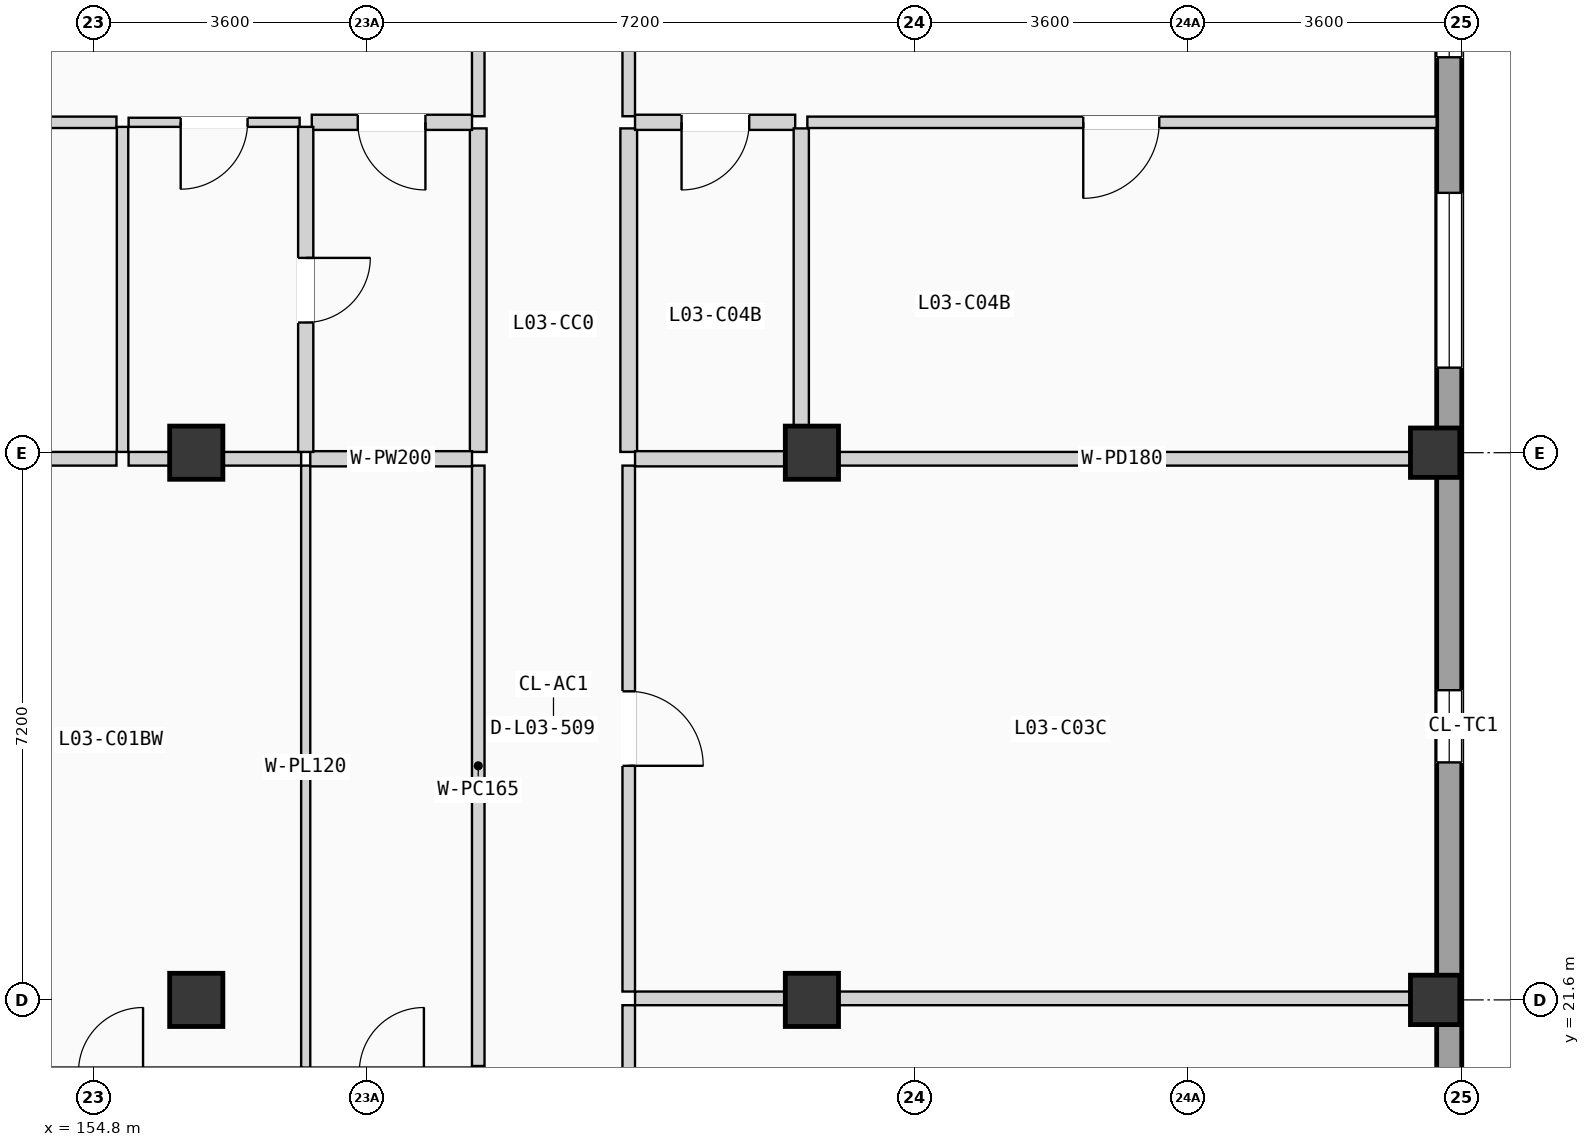
"""IFC4 building model, lengths in metres.
Left out: names, types, materials, properties, quantities, classifications, styles, units other than length and angle.
Written with IfcOpenShell. Run it as: python <this file> out.ifc"""

import sys

from ifc_helpers import new_model, si_unit, direction, frame, frame_2d, origin, origin_2d, place, context, subcontext, project, spatial, rectangle, extrude, element, fill, save


model = new_model("IFC4")
c1 = context("Model", 3, precision=1e-05, world=origin(), true_north=direction((0.0, 1.0)))
c2 = subcontext(c1, "Body", "Model", "MODEL_VIEW")
j1 = project(units=[si_unit("LENGTHUNIT", "METRE"), si_unit("PLANEANGLEUNIT", "RADIAN")], contexts=[c1])
p1 = place(None, origin())
s1 = spatial("IfcSite", under=j1, at=p1, CompositionType="ELEMENT")
p2 = place(p1, origin())
s2 = spatial("IfcBuilding", under=s1, at=p2, CompositionType="ELEMENT")
p3 = place(p2, frame((0.0, 0.0, 12.075)))
s3 = spatial("IfcBuildingStorey", under=s2, at=p3, CompositionType="ELEMENT", Elevation=12.075)
for number, where, z_axis, x_axis in (
    (1, (156.15, 21.6, 0.0), (0.0, 0.0, 1.0), (1.0, 0.0, 0.0)),
    (2, (156.15, 28.8, 0.0), (0.0, 0.0, 1.0), (1.0, 0.0, 0.0)),
    (3, (164.25, 21.6, 0.0), (0.0, 0.0, 1.0), (1.0, 0.0, 0.0)),
    (4, (164.25, 28.8, 0.0), (0.0, 0.0, 1.0), (1.0, 0.0, 0.0)),
):
    element("IfcColumn", number, at=place(p3, frame(where, z_axis=z_axis, x_axis=x_axis)), inside=s3, PredefinedType="COLUMN", context=c2, shape_type="SweptSolid", body=[
        extrude(rectangle(XDim=0.7, YDim=0.7, at=origin_2d()), origin(), (0.0, 0.0, 1.0), 3.15),
    ])
for number, where, z_axis, x_axis in (
    (5, (172.45, 21.6, 0.0), (0.0, 0.0, 1.0), (1.0, 0.0, 0.0)),
    (6, (172.45, 28.8, 0.0), (0.0, 0.0, 1.0), (1.0, 0.0, 0.0)),
):
    element("IfcColumn", number, at=place(p3, frame(where, z_axis=z_axis, x_axis=x_axis)), inside=s3, PredefinedType="COLUMN", context=c2, shape_type="SweptSolid", body=[
        extrude(rectangle(XDim=0.65, YDim=0.65, at=origin_2d()), origin(), (0.0, 0.0, 1.0), 3.15),
    ])
p4 = place(p3, frame((172.635, 0.33, 0.0), z_axis=(0.0, 0.0, 1.0), x_axis=(0.0, 1.0, 0.0)))
e7 = element("IfcWall", 7, at=p4, inside=s3, PredefinedType="SOLIDWALL", context=c2, shape_type="SweptSolid", body=[
    extrude(rectangle(XDim=49.74, YDim=0.33, at=frame_2d((24.87, 0.0))), origin(), (0.0, 0.0, 1.0), 2.89),
])
p5 = place(p4, frame((9.46, 0.0, 0.705)))
e8 = element("IfcOpeningElement", 8, at=p5, cuts=e7, PredefinedType="OPENING", context=c2, shape_type="SweptSolid", body=[
    extrude(rectangle(XDim=2.15, YDim=1.5, at=frame_2d((1.075, 0.75))), frame((0.0, 0.175, 0.0), z_axis=(0.0, -1.0, 0.0), x_axis=(1.0, 0.0, 0.0)), (0.0, 0.0, 1.0), 0.35),
])
p6 = place(p4, frame((16.61, 0.0, 0.555)))
e9 = element("IfcOpeningElement", 9, at=p6, cuts=e7, PredefinedType="OPENING", context=c2, shape_type="SweptSolid", body=[
    extrude(rectangle(XDim=2.15, YDim=1.65, at=frame_2d((1.075, 0.825))), frame((0.0, 0.175, 0.0), z_axis=(0.0, -1.0, 0.0), x_axis=(1.0, 0.0, 0.0)), (0.0, 0.0, 1.0), 0.35),
])
p7 = place(p4, frame((24.395, 0.0, 0.85)))
e10 = element("IfcOpeningElement", 10, at=p7, cuts=e7, PredefinedType="OPENING", context=c2, shape_type="SweptSolid", body=[
    extrude(rectangle(XDim=0.95, YDim=1.2, at=frame_2d((0.475, 0.6))), frame((0.0, 0.175, 0.0), z_axis=(0.0, -1.0, 0.0), x_axis=(1.0, 0.0, 0.0)), (0.0, 0.0, 1.0), 0.35),
])
p8 = place(p4, frame((33.673, 0.0, 0.85)))
e11 = element("IfcOpeningElement", 11, at=p8, cuts=e7, PredefinedType="OPENING", context=c2, shape_type="SweptSolid", body=[
    extrude(rectangle(XDim=0.95, YDim=1.2, at=frame_2d((0.475, 0.6))), frame((0.0, 0.175, 0.0), z_axis=(0.0, -1.0, 0.0), x_axis=(1.0, 0.0, 0.0)), (0.0, 0.0, 1.0), 0.35),
])
p9 = place(p4, frame((29.589, 0.0, 0.855)))
e12 = element("IfcOpeningElement", 12, at=p9, cuts=e7, PredefinedType="OPENING", context=c2, shape_type="SweptSolid", body=[
    extrude(rectangle(XDim=2.3, YDim=1.35, at=frame_2d((1.15, 0.675))), frame((0.0, 0.175, 0.0), z_axis=(0.0, -1.0, 0.0), x_axis=(1.0, 0.0, 0.0)), (0.0, 0.0, 1.0), 0.35),
])
p10 = place(p4, frame((39.191, 0.0, 0.705)))
e13 = element("IfcOpeningElement", 13, at=p10, cuts=e7, PredefinedType="OPENING", context=c2, shape_type="SweptSolid", body=[
    extrude(rectangle(XDim=2.3, YDim=1.5, at=frame_2d((1.15, 0.75))), frame((0.0, 0.175, 0.0), z_axis=(0.0, -1.0, 0.0), x_axis=(1.0, 0.0, 0.0)), (0.0, 0.0, 1.0), 0.35),
])
p11 = place(p3, frame((159.86, 20.73, 0.0), z_axis=(0.0, 0.0, 1.0), x_axis=(0.0, 1.0, 0.0)))
e14 = element("IfcWall", 14, at=p11, inside=s3, PredefinedType="PARTITIONING", context=c2, shape_type="SweptSolid", body=[
    extrude(rectangle(XDim=7.9, YDim=0.165, at=frame_2d((3.95, 0.0))), origin(), (0.0, 0.0, 1.0), 2.87),
])
p12 = place(p3, frame((159.86, 33.227, 0.0), z_axis=(0.0, 0.0, 1.0), x_axis=(0.0, 1.0, 0.0)))
e15 = element("IfcWall", 15, at=p12, inside=s3, PredefinedType="PARTITIONING", context=c2, shape_type="SweptSolid", body=[
    extrude(rectangle(XDim=5.156, YDim=0.165, at=frame_2d((2.578, 0.0))), origin(), (0.0, 0.0, 1.0), 2.87),
])
p13 = place(p12, frame((2.053, 0.0, 0.0)))
e16 = element("IfcOpeningElement", 16, at=p13, cuts=e15, PredefinedType="OPENING", context=c2, shape_type="SweptSolid", body=[
    extrude(rectangle(XDim=1.05, YDim=2.13, at=frame_2d((0.525, 1.065))), frame((0.0, 0.093, 0.0), z_axis=(0.0, -1.0, 0.0), x_axis=(1.0, 0.0, 0.0)), (0.0, 0.0, 1.0), 0.185),
])
p14 = place(p3, frame((159.86, 28.81, 0.0), z_axis=(0.0, 0.0, 1.0), x_axis=(0.0, 1.0, 0.0)))
e17 = element("IfcWall", 17, at=p14, inside=s3, PredefinedType="PLUMBINGWALL", context=c2, shape_type="SweptSolid", body=[
    extrude(rectangle(XDim=4.257, YDim=0.22, at=frame_2d((2.128, 0.0))), origin(), (0.0, 0.0, 1.0), 2.87),
])
p15 = place(p3, frame((161.84, 14.7, 0.0), z_axis=(0.0, 0.0, 1.0), x_axis=(0.0, 1.0, 0.0)))
e18 = element("IfcWall", 18, at=p15, inside=s3, PredefinedType="PARTITIONING", context=c2, shape_type="SweptSolid", body=[
    extrude(rectangle(XDim=6.83, YDim=0.165, at=frame_2d((3.415, 0.0))), origin(), (0.0, 0.0, 1.0), 2.87),
])
p16 = place(p15, frame((2.925, 0.0, 0.0)))
e19 = element("IfcOpeningElement", 19, at=p16, cuts=e18, PredefinedType="OPENING", context=c2, shape_type="SweptSolid", body=[
    extrude(rectangle(XDim=0.98, YDim=2.08, at=frame_2d((0.49, 1.04))), frame((0.0, 0.093, 0.0), z_axis=(0.0, -1.0, 0.0), x_axis=(1.0, 0.0, 0.0)), (0.0, 0.0, 1.0), 0.185),
])
p17 = place(p3, frame((161.84, 21.71, 0.0), z_axis=(0.0, 0.0, 1.0), x_axis=(0.0, 1.0, 0.0)))
e20 = element("IfcWall", 20, at=p17, inside=s3, PredefinedType="PARTITIONING", context=c2, shape_type="SweptSolid", body=[
    extrude(rectangle(XDim=6.92, YDim=0.165, at=frame_2d((3.46, 0.0))), origin(), (0.0, 0.0, 1.0), 2.87),
])
p18 = place(p17, frame((2.97, 0.0, 0.0)))
e21 = element("IfcOpeningElement", 21, at=p18, cuts=e20, PredefinedType="OPENING", context=c2, shape_type="SweptSolid", body=[
    extrude(rectangle(XDim=0.98, YDim=2.08, at=frame_2d((0.49, 1.04))), frame((0.0, 0.093, 0.0), z_axis=(0.0, -1.0, 0.0), x_axis=(1.0, 0.0, 0.0)), (0.0, 0.0, 1.0), 0.185),
])
p19 = place(p3, frame((161.84, 33.227, 0.0), z_axis=(0.0, 0.0, 1.0), x_axis=(0.0, 1.0, 0.0)))
e22 = element("IfcWall", 22, at=p19, inside=s3, PredefinedType="PARTITIONING", context=c2, shape_type="SweptSolid", body=[
    extrude(rectangle(XDim=5.156, YDim=0.165, at=frame_2d((2.578, 0.0))), origin(), (0.0, 0.0, 1.0), 2.87),
])
p20 = place(p19, frame((2.053, 0.0, 0.0)))
e23 = element("IfcOpeningElement", 23, at=p20, cuts=e22, PredefinedType="OPENING", context=c2, shape_type="SweptSolid", body=[
    extrude(rectangle(XDim=1.05, YDim=2.13, at=frame_2d((0.525, 1.065))), frame((0.0, 0.093, 0.0), z_axis=(0.0, -1.0, 0.0), x_axis=(1.0, 0.0, 0.0)), (0.0, 0.0, 1.0), 0.185),
])
p21 = place(p3, frame((161.84, 28.81, 0.0), z_axis=(0.0, 0.0, 1.0), x_axis=(0.0, 1.0, 0.0)))
e24 = element("IfcWall", 24, at=p21, inside=s3, PredefinedType="PLUMBINGWALL", context=c2, shape_type="SweptSolid", body=[
    extrude(rectangle(XDim=4.257, YDim=0.22, at=frame_2d((2.128, 0.0))), origin(), (0.0, 0.0, 1.0), 2.87),
])
p22 = place(p3, frame((157.59, 20.71, 0.0), z_axis=(0.0, 0.0, 1.0), x_axis=(0.0, 1.0, 0.0)))
e25 = element("IfcWall", 25, at=p22, inside=s3, PredefinedType="PARTITIONING", context=c2, shape_type="SweptSolid", body=[
    extrude(rectangle(XDim=7.92, YDim=0.12, at=frame_2d((3.96, 0.0))), origin(), (0.0, 0.0, 1.0), 2.87),
])
p23 = place(p3, frame((157.65, 28.72, 0.0), z_axis=(0.0, 0.0, 1.0), x_axis=(1.0, 0.0, 0.0)))
e26 = element("IfcWall", 26, at=p23, inside=s3, PredefinedType="PLUMBINGWALL", context=c2, shape_type="SweptSolid", body=[
    extrude(rectangle(XDim=2.128, YDim=0.2, at=frame_2d((1.064, 0.0))), origin(), (0.0, 0.0, 1.0), 2.16),
])
p24 = place(p3, frame((152.54, 28.72, 0.0), z_axis=(0.0, 0.0, 1.0), x_axis=(1.0, 0.0, 0.0)))
e27 = element("IfcWall", 27, at=p24, inside=s3, PredefinedType="PARTITIONING", context=c2, shape_type="SweptSolid", body=[
    extrude(rectangle(XDim=2.56, YDim=0.18, at=frame_2d((1.28, 0.0))), origin(), (0.0, 0.0, 1.0), 2.16),
])
p25 = place(p3, frame((155.26, 28.72, 0.0), z_axis=(0.0, 0.0, 1.0), x_axis=(1.0, 0.0, 0.0)))
e28 = element("IfcWall", 28, at=p25, inside=s3, PredefinedType="PARTITIONING", context=c2, shape_type="SweptSolid", body=[
    extrude(rectangle(XDim=2.27, YDim=0.18, at=frame_2d((1.135, 0.0))), origin(), (0.0, 0.0, 1.0), 2.16),
])
p26 = place(p3, frame((157.67, 33.147, 0.0), z_axis=(0.0, 0.0, 1.0), x_axis=(1.0, 0.0, 0.0)))
e29 = element("IfcWall", 29, at=p26, inside=s3, PredefinedType="PLUMBINGWALL", context=c2, shape_type="SweptSolid", body=[
    extrude(rectangle(XDim=2.108, YDim=0.2, at=frame_2d((1.054, 0.0))), origin(), (0.0, 0.0, 1.0), 2.87),
])
p27 = place(p26, frame((0.605, 0.0, 0.0)))
e30 = element("IfcOpeningElement", 30, at=p27, cuts=e29, PredefinedType="OPENING", context=c2, shape_type="SweptSolid", body=[
    extrude(rectangle(XDim=0.89, YDim=2.03, at=frame_2d((0.445, 1.015))), frame((0.0, 0.11, 0.0), z_axis=(0.0, -1.0, 0.0), x_axis=(1.0, 0.0, 0.0)), (0.0, 0.0, 1.0), 0.22),
])
p28 = place(p3, frame((147.93, 33.147, 0.0), z_axis=(0.0, 0.0, 1.0), x_axis=(1.0, 0.0, 0.0)))
e31 = element("IfcWall", 31, at=p28, inside=s3, PredefinedType="PARTITIONING", context=c2, shape_type="SweptSolid", body=[
    extrude(rectangle(XDim=7.17, YDim=0.15, at=frame_2d((3.585, 0.0))), origin(), (0.0, 0.0, 1.0), 2.87),
])
p29 = place(p28, frame((3.095, 0.0, 0.0)))
e32 = element("IfcOpeningElement", 32, at=p29, cuts=e31, PredefinedType="OPENING", context=c2, shape_type="SweptSolid", body=[
    extrude(rectangle(XDim=1.0, YDim=2.06, at=frame_2d((0.5, 1.03))), frame((0.0, 0.085, 0.0), z_axis=(0.0, -1.0, 0.0), x_axis=(1.0, 0.0, 0.0)), (0.0, 0.0, 1.0), 0.17),
])
p30 = place(p3, frame((155.26, 33.147, 0.0), z_axis=(0.0, 0.0, 1.0), x_axis=(1.0, 0.0, 0.0)))
e33 = element("IfcWall", 33, at=p30, inside=s3, PredefinedType="PARTITIONING", context=c2, shape_type="SweptSolid", body=[
    extrude(rectangle(XDim=2.25, YDim=0.12, at=frame_2d((1.125, 0.0))), origin(), (0.0, 0.0, 1.0), 2.87),
])
p31 = place(p30, frame((0.685, 0.0, 0.0)))
e34 = element("IfcOpeningElement", 34, at=p31, cuts=e33, PredefinedType="OPENING", context=c2, shape_type="SweptSolid", body=[
    extrude(rectangle(XDim=0.88, YDim=2.02, at=frame_2d((0.44, 1.01))), frame((0.0, 0.07, 0.0), z_axis=(0.0, -1.0, 0.0), x_axis=(1.0, 0.0, 0.0)), (0.0, 0.0, 1.0), 0.14),
])
p32 = place(p3, frame((157.59, 28.81, 0.0), z_axis=(0.0, 0.0, 1.0), x_axis=(0.0, 1.0, 0.0)))
e35 = element("IfcWall", 35, at=p32, inside=s3, PredefinedType="PLUMBINGWALL", context=c2, shape_type="SweptSolid", body=[
    extrude(rectangle(XDim=4.277, YDim=0.2, at=frame_2d((2.138, 0.0))), origin(), (0.0, 0.0, 1.0), 2.87),
])
p33 = place(p32, frame((1.703, 0.0, 0.0)))
e36 = element("IfcOpeningElement", 36, at=p33, cuts=e35, PredefinedType="OPENING", context=c2, shape_type="SweptSolid", body=[
    extrude(rectangle(XDim=0.85, YDim=2.01, at=frame_2d((0.425, 1.005))), frame((0.0, 0.11, 0.0), z_axis=(0.0, -1.0, 0.0), x_axis=(1.0, 0.0, 0.0)), (0.0, 0.0, 1.0), 0.22),
])
p34 = place(p3, frame((155.18, 28.81, 0.0), z_axis=(0.0, 0.0, 1.0), x_axis=(0.0, 1.0, 0.0)))
e37 = element("IfcWall", 37, at=p34, inside=s3, PredefinedType="PARTITIONING", context=c2, shape_type="SweptSolid", body=[
    extrude(rectangle(XDim=4.277, YDim=0.15, at=frame_2d((2.138, 0.0))), origin(), (0.0, 0.0, 1.0), 2.87),
])
p35 = place(p3, frame((161.923, 21.62, 0.0), z_axis=(0.0, 0.0, 1.0), x_axis=(1.0, 0.0, 0.0)))
e38 = element("IfcWall", 38, at=p35, inside=s3, PredefinedType="PARTITIONING", context=c2, shape_type="SweptSolid", body=[
    extrude(rectangle(XDim=10.547, YDim=0.18, at=frame_2d((5.273, 0.0))), origin(), (0.0, 0.0, 1.0), 2.16),
])
p36 = place(p3, frame((161.923, 28.72, 0.0), z_axis=(0.0, 0.0, 1.0), x_axis=(1.0, 0.0, 0.0)))
e39 = element("IfcWall", 39, at=p36, inside=s3, PredefinedType="PLUMBINGWALL", context=c2, shape_type="SweptSolid", body=[
    extrude(rectangle(XDim=2.107, YDim=0.2, at=frame_2d((1.053, 0.0))), origin(), (0.0, 0.0, 1.0), 2.16),
])
p37 = place(p3, frame((164.19, 28.72, 0.0), z_axis=(0.0, 0.0, 1.0), x_axis=(1.0, 0.0, 0.0)))
e40 = element("IfcWall", 40, at=p37, inside=s3, PredefinedType="PARTITIONING", context=c2, shape_type="SweptSolid", body=[
    extrude(rectangle(XDim=8.28, YDim=0.18, at=frame_2d((4.14, 0.0))), origin(), (0.0, 0.0, 1.0), 2.16),
])
p38 = place(p3, frame((161.923, 33.147, 0.0), z_axis=(0.0, 0.0, 1.0), x_axis=(1.0, 0.0, 0.0)))
e41 = element("IfcWall", 41, at=p38, inside=s3, PredefinedType="PLUMBINGWALL", context=c2, shape_type="SweptSolid", body=[
    extrude(rectangle(XDim=2.107, YDim=0.2, at=frame_2d((1.053, 0.0))), origin(), (0.0, 0.0, 1.0), 2.87),
])
p39 = place(p38, frame((0.612, 0.0, 0.0)))
e42 = element("IfcOpeningElement", 42, at=p39, cuts=e41, PredefinedType="OPENING", context=c2, shape_type="SweptSolid", body=[
    extrude(rectangle(XDim=0.89, YDim=2.03, at=frame_2d((0.445, 1.015))), frame((0.0, 0.11, 0.0), z_axis=(0.0, -1.0, 0.0), x_axis=(1.0, 0.0, 0.0)), (0.0, 0.0, 1.0), 0.22),
])
p40 = place(p3, frame((164.19, 33.147, 0.0), z_axis=(0.0, 0.0, 1.0), x_axis=(1.0, 0.0, 0.0)))
e43 = element("IfcWall", 43, at=p40, inside=s3, PredefinedType="PARTITIONING", context=c2, shape_type="SweptSolid", body=[
    extrude(rectangle(XDim=8.28, YDim=0.15, at=frame_2d((4.14, 0.0))), origin(), (0.0, 0.0, 1.0), 2.87),
])
p41 = place(p40, frame((3.63, 0.0, 0.0)))
e44 = element("IfcOpeningElement", 44, at=p41, cuts=e43, PredefinedType="OPENING", context=c2, shape_type="SweptSolid", body=[
    extrude(rectangle(XDim=1.0, YDim=2.06, at=frame_2d((0.5, 1.03))), frame((0.0, 0.085, 0.0), z_axis=(0.0, -1.0, 0.0), x_axis=(1.0, 0.0, 0.0)), (0.0, 0.0, 1.0), 0.17),
])
p42 = place(p3, frame((164.11, 28.81, 0.0), z_axis=(0.0, 0.0, 1.0), x_axis=(0.0, 1.0, 0.0)))
e45 = element("IfcWall", 45, at=p42, inside=s3, PredefinedType="PLUMBINGWALL", context=c2, shape_type="SweptSolid", body=[
    extrude(rectangle(XDim=4.257, YDim=0.2, at=frame_2d((2.128, 0.0))), origin(), (0.0, 0.0, 1.0), 2.87),
])
p43 = place(p7, origin())
e46 = element("IfcWindow", 46, at=p43, inside=s3, PartitioningType="SINGLE_PANEL", PredefinedType="WINDOW", context=c2, shape_type="SweptSolid", body=[
    extrude(rectangle(XDim=0.95, YDim=1.2, at=frame_2d((0.475, 0.6))), frame((0.0, 0.03, 0.0), z_axis=(0.0, -1.0, 0.0), x_axis=(1.0, 0.0, 0.0)), (0.0, 0.0, 1.0), 0.06),
])
fill(e10, e46)
p44 = place(p8, origin())
e47 = element("IfcWindow", 47, at=p44, inside=s3, PartitioningType="SINGLE_PANEL", PredefinedType="WINDOW", context=c2, shape_type="SweptSolid", body=[
    extrude(rectangle(XDim=0.95, YDim=1.2, at=frame_2d((0.475, 0.6))), frame((0.0, 0.03, 0.0), z_axis=(0.0, -1.0, 0.0), x_axis=(1.0, 0.0, 0.0)), (0.0, 0.0, 1.0), 0.06),
])
fill(e11, e47)
p45 = place(p9, origin())
e48 = element("IfcWindow", 48, at=p45, inside=s3, PartitioningType="DOUBLE_PANEL_VERTICAL", PredefinedType="WINDOW", context=c2, shape_type="SweptSolid", body=[
    extrude(rectangle(XDim=2.3, YDim=1.35, at=frame_2d((1.15, 0.675))), frame((0.0, 0.03, 0.0), z_axis=(0.0, -1.0, 0.0), x_axis=(1.0, 0.0, 0.0)), (0.0, 0.0, 1.0), 0.06),
])
fill(e12, e48)
p46 = place(p18, frame((0.98, 0.0, 0.0), z_axis=(0.0, 0.0, 1.0), x_axis=(-1.0, 0.0, 0.0)))
e49 = element("IfcDoor", 49, at=p46, inside=s3, OperationType="SINGLE_SWING_LEFT", PredefinedType="DOOR", context=c2, shape_type="SweptSolid", body=[
    extrude(rectangle(XDim=0.98, YDim=2.08, at=frame_2d((0.49, 1.04))), frame((0.0, 0.025, 0.0), z_axis=(0.0, -1.0, 0.0), x_axis=(1.0, 0.0, 0.0)), (0.0, 0.0, 1.0), 0.05),
])
fill(e21, e49)
p47 = place(p27, frame((0.89, 0.0, 0.0), z_axis=(0.0, 0.0, 1.0), x_axis=(-1.0, 0.0, 0.0)))
e50 = element("IfcDoor", 50, at=p47, inside=s3, OperationType="SINGLE_SWING_RIGHT", PredefinedType="DOOR", context=c2, shape_type="SweptSolid", body=[
    extrude(rectangle(XDim=0.89, YDim=2.03, at=frame_2d((0.445, 1.015))), frame((0.0, 0.025, 0.0), z_axis=(0.0, -1.0, 0.0), x_axis=(1.0, 0.0, 0.0)), (0.0, 0.0, 1.0), 0.05),
])
fill(e30, e50)
p48 = place(p31, frame((0.88, 0.0, 0.0), z_axis=(0.0, 0.0, 1.0), x_axis=(-1.0, 0.0, 0.0)))
e51 = element("IfcDoor", 51, at=p48, inside=s3, OperationType="SINGLE_SWING_LEFT", PredefinedType="DOOR", context=c2, shape_type="SweptSolid", body=[
    extrude(rectangle(XDim=0.88, YDim=2.02, at=frame_2d((0.44, 1.01))), frame((0.0, 0.025, 0.0), z_axis=(0.0, -1.0, 0.0), x_axis=(1.0, 0.0, 0.0)), (0.0, 0.0, 1.0), 0.05),
])
fill(e34, e51)
p49 = place(p33, frame((0.85, 0.0, 0.0), z_axis=(0.0, 0.0, 1.0), x_axis=(-1.0, 0.0, 0.0)))
e52 = element("IfcDoor", 52, at=p49, inside=s3, OperationType="SINGLE_SWING_RIGHT", PredefinedType="DOOR", context=c2, shape_type="SweptSolid", body=[
    extrude(rectangle(XDim=0.85, YDim=2.01, at=frame_2d((0.425, 1.005))), frame((0.0, 0.025, 0.0), z_axis=(0.0, -1.0, 0.0), x_axis=(1.0, 0.0, 0.0)), (0.0, 0.0, 1.0), 0.05),
])
fill(e36, e52)
p50 = place(p39, frame((0.89, 0.0, 0.0), z_axis=(0.0, 0.0, 1.0), x_axis=(-1.0, 0.0, 0.0)))
e53 = element("IfcDoor", 53, at=p50, inside=s3, OperationType="SINGLE_SWING_LEFT", PredefinedType="DOOR", context=c2, shape_type="SweptSolid", body=[
    extrude(rectangle(XDim=0.89, YDim=2.03, at=frame_2d((0.445, 1.015))), frame((0.0, 0.025, 0.0), z_axis=(0.0, -1.0, 0.0), x_axis=(1.0, 0.0, 0.0)), (0.0, 0.0, 1.0), 0.05),
])
fill(e42, e53)
p51 = place(p41, frame((1.0, 0.0, 0.0), z_axis=(0.0, 0.0, 1.0), x_axis=(-1.0, 0.0, 0.0)))
e54 = element("IfcDoor", 54, at=p51, inside=s3, OperationType="SINGLE_SWING_LEFT", PredefinedType="DOOR", context=c2, shape_type="SweptSolid", body=[
    extrude(rectangle(XDim=1.0, YDim=2.06, at=frame_2d((0.5, 1.03))), frame((0.0, 0.025, 0.0), z_axis=(0.0, -1.0, 0.0), x_axis=(1.0, 0.0, 0.0)), (0.0, 0.0, 1.0), 0.05),
])
fill(e44, e54)
save(model, sys.argv[1])
